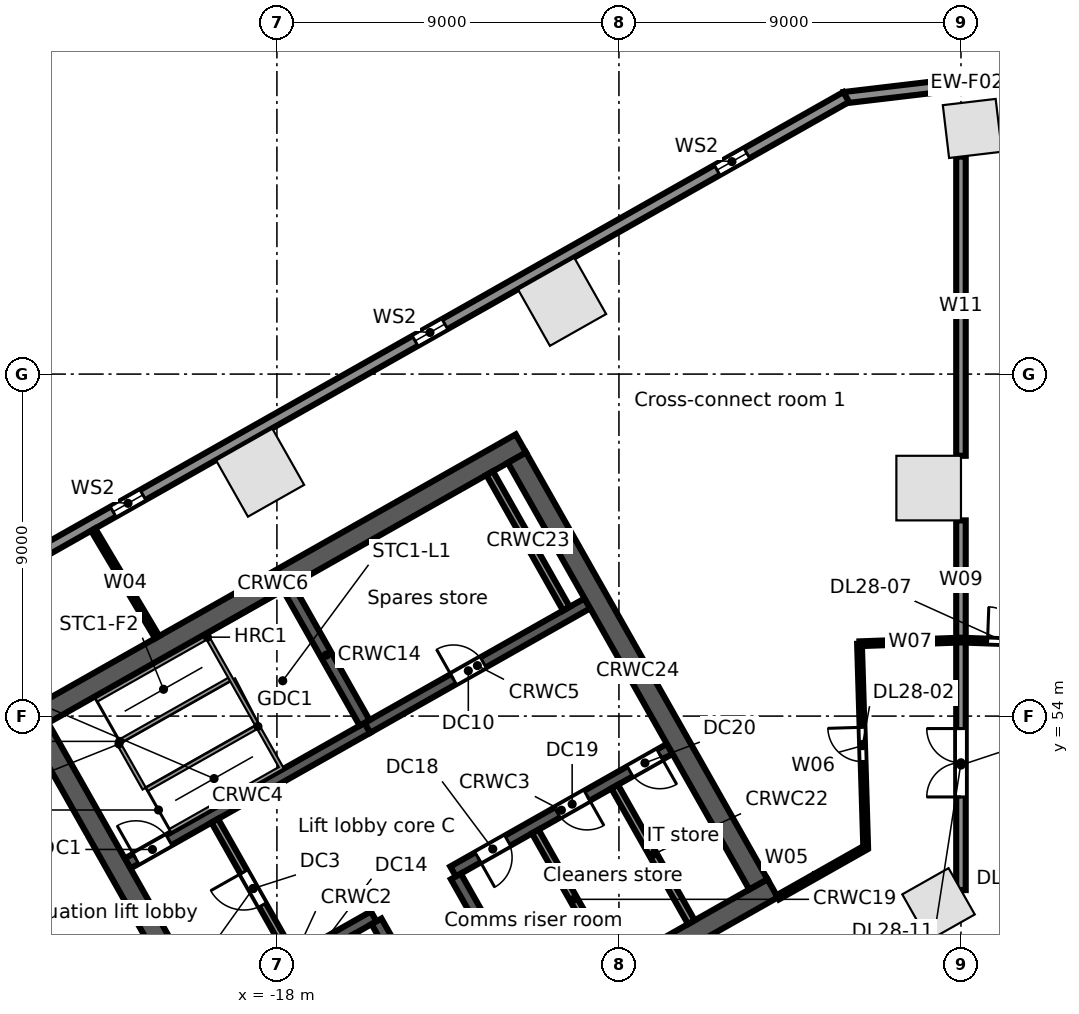
"""IFC4 building model, lengths in metres.
Left out: names, types, materials, properties, quantities, classifications, styles, units other than length and angle.
Written with IfcOpenShell. Run it as: python <this file> out.ifc"""

import sys

from ifc_helpers import new_model, si_unit, direction, frame, frame_2d, origin, origin_2d, place, context, subcontext, project, spatial, rectangle, extrude, element, fill, save


model = new_model("IFC4")
c1 = context("Model", 3, precision=1e-05, world=origin(), true_north=direction((0.0, 1.0)))
c2 = subcontext(c1, "Body", "Model", "MODEL_VIEW")
j1 = project(units=[si_unit("LENGTHUNIT", "METRE"), si_unit("PLANEANGLEUNIT", "RADIAN")], contexts=[c1])
p1 = place(None, origin())
s1 = spatial("IfcSite", under=j1, at=p1, CompositionType="ELEMENT")
p2 = place(p1, origin())
s2 = spatial("IfcBuilding", under=s1, at=p2, CompositionType="ELEMENT")
p3 = place(p2, frame((0.0, 0.0, 136.7)))
s3 = spatial("IfcBuildingStorey", under=s2, at=p3, CompositionType="ELEMENT", Elevation=136.7)
p4 = place(p3, frame((0.3, 69.464, 0.0), z_axis=(0.0, 0.0, 1.0), x_axis=(-0.993068456955, -0.117537397458, 0.0)))
e1 = element("IfcColumn", 1, at=p4, inside=s3, PredefinedType="COLUMN", context=c2, shape_type="SweptSolid", body=[
    extrude(rectangle(XDim=1.4, YDim=1.4, at=origin_2d()), origin(), (0.0, 0.0, 1.0), 4.4),
])
for number, where, z_axis, x_axis in (
    (2, (-10.495, 64.902, 0.0), (0.0, 0.0, 1.0), (-0.87, -0.492, 0.0)),
    (3, (-18.441, 60.406, 0.0), (0.0, 0.0, 1.0), (-0.87, -0.492, 0.0)),
):
    element("IfcColumn", number, at=place(p3, frame(where, z_axis=z_axis, x_axis=x_axis)), inside=s3, PredefinedType="COLUMN", context=c2, shape_type="SweptSolid", body=[
        extrude(rectangle(XDim=1.7, YDim=1.7, at=origin_2d()), origin(), (0.0, 0.0, 1.0), 4.4),
    ])
p5 = place(p3, frame((-0.591, 49.044, 0.0), z_axis=(0.0, 0.0, 1.0), x_axis=(0.87035569594, 0.492423560103, 0.0)))
e4 = element("IfcColumn", 4, at=p5, inside=s3, PredefinedType="COLUMN", context=c2, shape_type="SweptSolid", body=[
    extrude(rectangle(XDim=1.4, YDim=1.4, at=origin_2d()), origin(), (0.0, 0.0, 1.0), 4.4),
])
p6 = place(p3, frame((-0.85, 60.0, 0.0), z_axis=(0.0, 0.0, 1.0), x_axis=(0.0, 1.0, 0.0)))
e5 = element("IfcColumn", 5, at=p6, inside=s3, PredefinedType="COLUMN", context=c2, shape_type="SweptSolid", body=[
    extrude(rectangle(XDim=1.7, YDim=1.7, at=origin_2d()), origin(), (0.0, 0.0, 1.0), 4.4),
])
p7 = place(p3, frame((-3.076, 70.273, 0.0), z_axis=(0.0, 0.0, 1.0), x_axis=(0.993067743007, 0.117543429416, 0.0)))
e6 = element("IfcWall", 6, at=p7, inside=s3, PredefinedType="STANDARD", context=c2, shape_type="SweptSolid", body=[
    extrude(rectangle(XDim=6.516, YDim=0.3, at=frame_2d((3.258, 0.0))), origin(), (0.0, 0.0, 1.0), 4.08),
])
p8 = place(p3, frame((-58.745, 38.764, 0.0), z_axis=(0.0, 0.0, 1.0), x_axis=(0.870355811726, 0.492423355453, 0.0)))
e7 = element("IfcWall", 7, at=p8, inside=s3, PredefinedType="STANDARD", context=c2, shape_type="SweptSolid", body=[
    extrude(rectangle(XDim=64.025, YDim=0.3, at=frame_2d((32.013, 0.0))), origin(), (0.0, 0.0, 1.0), 4.08),
])
p9 = place(p8, frame((60.122, 0.0, 0.6)))
e8 = element("IfcOpeningElement", 8, at=p9, cuts=e7, PredefinedType="OPENING", context=c2, shape_type="SweptSolid", body=[
    extrude(rectangle(XDim=0.9, YDim=2.8, at=frame_2d((0.45, 1.4))), frame((0.0, 0.16, 0.0), z_axis=(0.0, -1.0, 0.0), x_axis=(1.0, 0.0, 0.0)), (0.0, 0.0, 1.0), 0.32),
])
p10 = place(p8, frame((50.992, 0.0, 0.6)))
e9 = element("IfcOpeningElement", 9, at=p10, cuts=e7, PredefinedType="OPENING", context=c2, shape_type="SweptSolid", body=[
    extrude(rectangle(XDim=0.9, YDim=2.8, at=frame_2d((0.45, 1.4))), frame((0.0, 0.16, 0.0), z_axis=(0.0, -1.0, 0.0), x_axis=(1.0, 0.0, 0.0)), (0.0, 0.0, 1.0), 0.32),
])
p11 = place(p8, frame((41.862, 0.0, 0.6)))
e10 = element("IfcOpeningElement", 10, at=p11, cuts=e7, PredefinedType="OPENING", context=c2, shape_type="SweptSolid", body=[
    extrude(rectangle(XDim=0.9, YDim=2.8, at=frame_2d((0.45, 1.4))), frame((0.0, 0.16, 0.0), z_axis=(0.0, -1.0, 0.0), x_axis=(1.0, 0.0, 0.0)), (0.0, 0.0, 1.0), 0.32),
])
p12 = place(p8, frame((32.732, 0.0, 0.6)))
e11 = element("IfcOpeningElement", 11, at=p12, cuts=e7, PredefinedType="OPENING", context=c2, shape_type="SweptSolid", body=[
    extrude(rectangle(XDim=0.9, YDim=2.8, at=frame_2d((0.45, 1.4))), frame((0.0, 0.16, 0.0), z_axis=(0.0, -1.0, 0.0), x_axis=(1.0, 0.0, 0.0)), (0.0, 0.0, 1.0), 0.32),
])
p13 = place(p8, frame((23.602, 0.0, 0.6)))
e12 = element("IfcOpeningElement", 12, at=p13, cuts=e7, PredefinedType="OPENING", context=c2, shape_type="SweptSolid", body=[
    extrude(rectangle(XDim=0.9, YDim=2.8, at=frame_2d((0.45, 1.4))), frame((0.0, 0.16, 0.0), z_axis=(0.0, -1.0, 0.0), x_axis=(1.0, 0.0, 0.0)), (0.0, 0.0, 1.0), 0.32),
])
p14 = place(p8, frame((14.472, 0.0, 0.6)))
e13 = element("IfcOpeningElement", 13, at=p14, cuts=e7, PredefinedType="OPENING", context=c2, shape_type="SweptSolid", body=[
    extrude(rectangle(XDim=0.9, YDim=2.8, at=frame_2d((0.45, 1.4))), frame((0.0, 0.16, 0.0), z_axis=(0.0, -1.0, 0.0), x_axis=(1.0, 0.0, 0.0)), (0.0, 0.0, 1.0), 0.32),
])
p15 = place(p8, frame((5.342, 0.0, 0.6)))
e14 = element("IfcOpeningElement", 14, at=p15, cuts=e7, PredefinedType="OPENING", context=c2, shape_type="SweptSolid", body=[
    extrude(rectangle(XDim=0.9, YDim=2.8, at=frame_2d((0.45, 1.4))), frame((0.0, 0.16, 0.0), z_axis=(0.0, -1.0, 0.0), x_axis=(1.0, 0.0, 0.0)), (0.0, 0.0, 1.0), 0.32),
])
p16 = place(p3, frame((-18.012, 42.083, 0.0), z_axis=(0.0, 0.0, 1.0), x_axis=(0.870360574057, 0.492414937962, 0.0)))
e15 = element("IfcWall", 15, at=p16, inside=s3, PredefinedType="SOLIDWALL", context=c2, shape_type="SweptSolid", body=[
    extrude(rectangle(XDim=15.0, YDim=0.55, at=frame_2d((7.5, 0.0))), origin(), (0.0, 0.0, 1.0), 4.08),
])
p17 = place(p16, frame((6.1, 0.0, 0.0)))
e16 = element("IfcOpeningElement", 16, at=p17, cuts=e15, PredefinedType="OPENING", context=c2, shape_type="SweptSolid", body=[
    extrude(rectangle(XDim=1.2, YDim=2.1, at=frame_2d((0.6, 1.05))), frame((0.0, 0.285, 0.0), z_axis=(0.0, -1.0, 0.0), x_axis=(1.0, 0.0, 0.0)), (0.0, 0.0, 1.0), 0.57),
])
p18 = place(p3, frame((-19.762, 46.292, 0.0), z_axis=(0.0, 0.0, 1.0), x_axis=(0.870359758983, 0.49241637863, 0.0)))
e17 = element("IfcWall", 17, at=p18, inside=s3, PredefinedType="SOLIDWALL", context=c2, shape_type="SweptSolid", body=[
    extrude(rectangle(XDim=4.95, YDim=0.3, at=frame_2d((2.475, 0.0))), origin(), (0.0, 0.0, 1.0), 4.08),
])
p19 = place(p18, frame((0.6, 0.0, 0.0)))
e18 = element("IfcOpeningElement", 18, at=p19, cuts=e17, PredefinedType="OPENING", context=c2, shape_type="SweptSolid", body=[
    extrude(rectangle(XDim=1.1, YDim=2.1, at=frame_2d((0.55, 1.05))), frame((0.0, 0.16, 0.0), z_axis=(0.0, -1.0, 0.0), x_axis=(1.0, 0.0, 0.0)), (0.0, 0.0, 1.0), 0.32),
])
p20 = place(p18, frame((2.9, 0.0, 0.0)))
e19 = element("IfcOpeningElement", 19, at=p20, cuts=e17, PredefinedType="OPENING", context=c2, shape_type="SweptSolid", body=[
    extrude(rectangle(XDim=0.9, YDim=2.1, at=frame_2d((0.45, 1.05))), frame((0.0, 0.16, 0.0), z_axis=(0.0, -1.0, 0.0), x_axis=(1.0, 0.0, 0.0)), (0.0, 0.0, 1.0), 0.32),
])
p21 = place(p3, frame((-13.365, 49.911, 0.0), z_axis=(0.0, 0.0, 1.0), x_axis=(0.870336435567, 0.492457601144, 0.0)))
e20 = element("IfcWall", 20, at=p21, inside=s3, PredefinedType="SOLIDWALL", context=c2, shape_type="SweptSolid", body=[
    extrude(rectangle(XDim=6.55, YDim=0.3, at=frame_2d((3.275, 0.0))), origin(), (0.0, 0.0, 1.0), 4.08),
])
p22 = place(p21, frame((0.75, 0.0, 0.0)))
e21 = element("IfcOpeningElement", 21, at=p22, cuts=e20, PredefinedType="OPENING", context=c2, shape_type="SweptSolid", body=[
    extrude(rectangle(XDim=0.9, YDim=2.1, at=frame_2d((0.45, 1.05))), frame((0.0, 0.16, 0.0), z_axis=(0.0, -1.0, 0.0), x_axis=(1.0, 0.0, 0.0)), (0.0, 0.0, 1.0), 0.32),
])
p23 = place(p21, frame((3.15, 0.0, 0.0)))
e22 = element("IfcOpeningElement", 22, at=p23, cuts=e20, PredefinedType="OPENING", context=c2, shape_type="SweptSolid", body=[
    extrude(rectangle(XDim=0.9, YDim=2.1, at=frame_2d((0.45, 1.05))), frame((0.0, 0.16, 0.0), z_axis=(0.0, -1.0, 0.0), x_axis=(1.0, 0.0, 0.0)), (0.0, 0.0, 1.0), 0.32),
])
p24 = place(p21, frame((5.35, 0.0, 0.0)))
e23 = element("IfcOpeningElement", 23, at=p24, cuts=e20, PredefinedType="OPENING", context=c2, shape_type="SweptSolid", body=[
    extrude(rectangle(XDim=0.9, YDim=2.1, at=frame_2d((0.45, 1.05))), frame((0.0, 0.16, 0.0), z_axis=(0.0, -1.0, 0.0), x_axis=(1.0, 0.0, 0.0)), (0.0, 0.0, 1.0), 0.32),
])
p25 = place(p3, frame((-21.928, 50.121, 0.0), z_axis=(0.0, 0.0, 1.0), x_axis=(0.870340732628, 0.49245000673, 0.0)))
e24 = element("IfcWall", 24, at=p25, inside=s3, PredefinedType="SOLIDWALL", context=c2, shape_type="SweptSolid", body=[
    extrude(rectangle(XDim=7.25, YDim=0.3, at=frame_2d((3.625, 0.0))), origin(), (0.0, 0.0, 1.0), 4.08),
])
p26 = place(p25, frame((0.25, 0.0, 0.0)))
e25 = element("IfcOpeningElement", 25, at=p26, cuts=e24, PredefinedType="OPENING", context=c2, shape_type="SweptSolid", body=[
    extrude(rectangle(XDim=1.0, YDim=2.1, at=frame_2d((0.5, 1.05))), frame((0.0, 0.16, 0.0), z_axis=(0.0, -1.0, 0.0), x_axis=(1.0, 0.0, 0.0)), (0.0, 0.0, 1.0), 0.32),
])
p27 = place(p3, frame((-15.618, 53.691, 0.0), z_axis=(0.0, 0.0, 1.0), x_axis=(0.870367894134, 0.492401999246, 0.0)))
e26 = element("IfcWall", 26, at=p27, inside=s3, PredefinedType="SOLIDWALL", context=c2, shape_type="SweptSolid", body=[
    extrude(rectangle(XDim=6.65, YDim=0.3, at=frame_2d((3.325, 0.0))), origin(), (0.0, 0.0, 1.0), 4.08),
])
p28 = place(p27, frame((2.6, 0.0, 0.0)))
e27 = element("IfcOpeningElement", 27, at=p28, cuts=e26, PredefinedType="OPENING", context=c2, shape_type="SweptSolid", body=[
    extrude(rectangle(XDim=0.9, YDim=2.1, at=frame_2d((0.45, 1.05))), frame((0.0, 0.16, 0.0), z_axis=(0.0, -1.0, 0.0), x_axis=(1.0, 0.0, 0.0)), (0.0, 0.0, 1.0), 0.32),
])
p29 = place(p3, frame((-24.635, 53.789, 0.0), z_axis=(0.0, 0.0, 1.0), x_axis=(0.870360574057, 0.492414937962, 0.0)))
e28 = element("IfcWall", 28, at=p29, inside=s3, PredefinedType="SOLIDWALL", context=c2, shape_type="SweptSolid", body=[
    extrude(rectangle(XDim=15.0, YDim=0.55, at=frame_2d((7.5, 0.0))), origin(), (0.0, 0.0, 1.0), 4.08),
])
p30 = place(p3, frame((-24.26, 53.685, 0.0), z_axis=(0.0, 0.0, 1.0), x_axis=(0.492427022044, -0.870353737259, 0.0)))
e29 = element("IfcWall", 29, at=p30, inside=s3, PredefinedType="SOLIDWALL", context=c2, shape_type="SweptSolid", body=[
    extrude(rectangle(XDim=12.9, YDim=0.55, at=frame_2d((6.45, 0.0))), origin(), (0.0, 0.0, 1.0), 4.08),
])
p31 = place(p3, frame((-19.635, 51.246, 0.0), z_axis=(0.0, 0.0, 1.0), x_axis=(0.492408451753, -0.87036424366, 0.0)))
e30 = element("IfcWall", 30, at=p31, inside=s3, PredefinedType="PARTITIONING", context=c2, shape_type="SweptSolid", body=[
    extrude(rectangle(XDim=4.1, YDim=0.2, at=frame_2d((2.05, 0.0))), origin(), (0.0, 0.0, 1.0), 4.08),
])
p32 = place(p31, frame((1.55, 0.0, 0.0)))
e31 = element("IfcOpeningElement", 31, at=p32, cuts=e30, PredefinedType="OPENING", context=c2, shape_type="SweptSolid", body=[
    extrude(rectangle(XDim=1.0, YDim=2.1, at=frame_2d((0.5, 1.05))), frame((0.0, 0.11, 0.0), z_axis=(0.0, -1.0, 0.0), x_axis=(1.0, 0.0, 0.0)), (0.0, 0.0, 1.0), 0.22),
])
for number, where, z_axis, x_axis in (
    (32, (-15.379, 48.599, 0.0), (0.0, 0.0, 1.0), (0.492, -0.87, 0.0)),
    (33, (-17.711, 57.39, 0.0), (0.0, 0.0, 1.0), (0.492, -0.87, 0.0)),
):
    element("IfcWall", number, at=place(p3, frame(where, z_axis=z_axis, x_axis=x_axis)), inside=s3, PredefinedType="SOLIDWALL", context=c2, shape_type="SweptSolid", body=[
        extrude(rectangle(XDim=4.1, YDim=0.3, at=frame_2d((2.05, 0.0))), origin(), (0.0, 0.0, 1.0), 4.08),
    ])
p33 = place(p3, frame((-13.291, 49.781, 0.0), z_axis=(0.0, 0.0, 1.0), x_axis=(0.492382931784, -0.870378681085, 0.0)))
e34 = element("IfcWall", 34, at=p33, inside=s3, PredefinedType="SOLIDWALL", context=c2, shape_type="SweptSolid", body=[
    extrude(rectangle(XDim=4.1, YDim=0.3, at=frame_2d((2.05, 0.0))), origin(), (0.0, 0.0, 1.0), 4.08),
])
p34 = place(p3, frame((-11.202, 50.962, 0.0), z_axis=(0.0, 0.0, 1.0), x_axis=(0.492428039142, -0.870353161807, 0.0)))
e35 = element("IfcWall", 35, at=p34, inside=s3, PredefinedType="PARTITIONING", context=c2, shape_type="SweptSolid", body=[
    extrude(rectangle(XDim=4.1, YDim=0.2, at=frame_2d((2.05, 0.0))), origin(), (0.0, 0.0, 1.0), 4.08),
])
p35 = place(p3, frame((-9.113, 52.144, 0.0), z_axis=(0.0, 0.0, 1.0), x_axis=(0.492408451753, -0.87036424366, 0.0)))
e36 = element("IfcWall", 36, at=p35, inside=s3, PredefinedType="PARTITIONING", context=c2, shape_type="SweptSolid", body=[
    extrude(rectangle(XDim=4.1, YDim=0.2, at=frame_2d((2.05, 0.0))), origin(), (0.0, 0.0, 1.0), 4.08),
])
p36 = place(p3, frame((-12.402, 60.394, 0.0), z_axis=(0.0, 0.0, 1.0), x_axis=(0.492453559952, -0.87033872216, 0.0)))
e37 = element("IfcWall", 37, at=p36, inside=s3, PredefinedType="SOLIDWALL", context=c2, shape_type="SweptSolid", body=[
    extrude(rectangle(XDim=4.1, YDim=0.2, at=frame_2d((2.05, 0.0))), origin(), (0.0, 0.0, 1.0), 4.08),
])
p37 = place(p3, frame((-11.684, 60.8, 0.0), z_axis=(0.0, 0.0, 1.0), x_axis=(0.492427022044, -0.870353737259, 0.0)))
e38 = element("IfcWall", 38, at=p37, inside=s3, PredefinedType="SOLIDWALL", context=c2, shape_type="SweptSolid", body=[
    extrude(rectangle(XDim=12.9, YDim=0.55, at=frame_2d((6.45, 0.0))), origin(), (0.0, 0.0, 1.0), 4.08),
])
p38 = place(p3, frame((-22.835, 58.908, 0.0), z_axis=(0.0, 0.0, 1.0), x_axis=(0.511113859879, -0.859513014584, 0.0)))
e39 = element("IfcWall", 39, at=p38, inside=s3, PredefinedType="PARTITIONING", context=c2, shape_type="SweptSolid", body=[
    extrude(rectangle(XDim=3.295, YDim=0.125, at=frame_2d((1.647, 0.0))), origin(), (0.0, 0.0, 1.0), 3.36),
])
p39 = place(p3, frame((-4.821, 49.23, 0.0), z_axis=(0.0, 0.0, 1.0), x_axis=(0.870371217631, 0.492396124598, 0.0)))
e40 = element("IfcWall", 40, at=p39, inside=s3, PredefinedType="PARTITIONING", context=c2, shape_type="SweptSolid", body=[
    extrude(rectangle(XDim=2.659, YDim=0.125, at=frame_2d((1.329, 0.0))), origin(), (0.0, 0.0, 1.0), 4.08),
])
p40 = place(p3, frame((-2.67, 55.904, 0.0), z_axis=(0.0, 0.0, 1.0), x_axis=(0.030338701418, -0.999539675649, 0.0)))
e41 = element("IfcWall", 41, at=p40, inside=s3, PredefinedType="PARTITIONING", context=c2, shape_type="SweptSolid", body=[
    extrude(rectangle(XDim=5.367, YDim=0.125, at=frame_2d((2.684, 0.0))), origin(), (0.0, 0.0, 1.0), 4.08),
])
p41 = place(p40, frame((2.2, 0.0, 0.0)))
e42 = element("IfcOpeningElement", 42, at=p41, cuts=e41, PredefinedType="OPENING", context=c2, shape_type="SweptSolid", body=[
    extrude(rectangle(XDim=0.9, YDim=2.1, at=frame_2d((0.45, 1.05))), frame((0.0, 0.073, 0.0), z_axis=(0.0, -1.0, 0.0), x_axis=(1.0, 0.0, 0.0)), (0.0, 0.0, 1.0), 0.145),
])
p42 = place(p3, frame((-2.67, 55.904, 0.0), z_axis=(0.0, 0.0, 1.0), x_axis=(0.999354913865, 0.03591317494, 0.0)))
e43 = element("IfcWall", 43, at=p42, inside=s3, PredefinedType="PARTITIONING", context=c2, shape_type="SweptSolid", body=[
    extrude(rectangle(XDim=2.672, YDim=0.125, at=frame_2d((1.336, 0.0))), origin(), (0.0, 0.0, 1.0), 3.142),
])
p43 = place(p3, frame((0.0, 49.422, 0.0), z_axis=(0.0, 0.0, 1.0), x_axis=(0.0, 1.0, 0.0)))
e44 = element("IfcWall", 44, at=p43, inside=s3, PredefinedType="PARTITIONING", context=c2, shape_type="SweptSolid", body=[
    extrude(rectangle(XDim=6.578, YDim=0.25, at=frame_2d((3.289, 0.0))), origin(), (0.0, 0.0, 1.0), 4.08),
])
p44 = place(p43, frame((2.45, 0.0, 0.0)))
e45 = element("IfcOpeningElement", 45, at=p44, cuts=e44, PredefinedType="OPENING", context=c2, shape_type="SweptSolid", body=[
    extrude(rectangle(XDim=1.8, YDim=2.1, at=frame_2d((0.9, 1.05))), frame((0.0, 0.135, 0.0), z_axis=(0.0, -1.0, 0.0), x_axis=(1.0, 0.0, 0.0)), (0.0, 0.0, 1.0), 0.27),
])
p45 = place(p3, frame((0.0, 56.0, 0.0), z_axis=(0.0, 0.0, 1.0), x_axis=(0.0, 1.0, 0.0)))
e46 = element("IfcWall", 46, at=p45, inside=s3, PredefinedType="PARTITIONING", context=c2, shape_type="SweptSolid", body=[
    extrude(rectangle(XDim=3.15, YDim=0.25, at=frame_2d((1.575, 0.0))), origin(), (0.0, 0.0, 1.0), 4.08),
])
p46 = place(p3, frame((0.0, 56.0, 0.0), z_axis=(0.0, 0.0, 1.0), x_axis=(0.999349313684, -0.036068673934, 0.0)))
e47 = element("IfcWall", 47, at=p46, inside=s3, PredefinedType="PARTITIONING", context=c2, shape_type="SweptSolid", body=[
    extrude(rectangle(XDim=2.471, YDim=0.125, at=frame_2d((1.235, 0.0))), origin(), (0.0, 0.0, 1.0), 4.08),
])
p47 = place(p46, frame((0.7, 0.0, 0.0)))
e48 = element("IfcOpeningElement", 48, at=p47, cuts=e47, PredefinedType="OPENING", context=c2, shape_type="SweptSolid", body=[
    extrude(rectangle(XDim=0.9, YDim=2.1, at=frame_2d((0.45, 1.05))), frame((0.0, 0.073, 0.0), z_axis=(0.0, -1.0, 0.0), x_axis=(1.0, 0.0, 0.0)), (0.0, 0.0, 1.0), 0.145),
])
p48 = place(p3, frame((0.0, 60.85, 0.0), z_axis=(0.0, 0.0, 1.0), x_axis=(0.0, 1.0, 0.0)))
e49 = element("IfcWall", 49, at=p48, inside=s3, PredefinedType="PARTITIONING", context=c2, shape_type="SweptSolid", body=[
    extrude(rectangle(XDim=7.874, YDim=0.25, at=frame_2d((3.937, 0.0))), origin(), (0.0, 0.0, 1.0), 3.352),
])
p49 = place(p9, origin())
e50 = element("IfcWindow", 50, at=p49, inside=s3, PartitioningType="SINGLE_PANEL", PredefinedType="WINDOW", context=c2, shape_type="SweptSolid", body=[
    extrude(rectangle(XDim=0.9, YDim=2.8, at=frame_2d((0.45, 1.4))), frame((0.0, 0.03, 0.0), z_axis=(0.0, -1.0, 0.0), x_axis=(1.0, 0.0, 0.0)), (0.0, 0.0, 1.0), 0.06),
])
fill(e8, e50)
p50 = place(p10, origin())
e51 = element("IfcWindow", 51, at=p50, inside=s3, PartitioningType="SINGLE_PANEL", PredefinedType="WINDOW", context=c2, shape_type="SweptSolid", body=[
    extrude(rectangle(XDim=0.9, YDim=2.8, at=frame_2d((0.45, 1.4))), frame((0.0, 0.03, 0.0), z_axis=(0.0, -1.0, 0.0), x_axis=(1.0, 0.0, 0.0)), (0.0, 0.0, 1.0), 0.06),
])
fill(e9, e51)
p51 = place(p11, origin())
e52 = element("IfcWindow", 52, at=p51, inside=s3, PartitioningType="SINGLE_PANEL", PredefinedType="WINDOW", context=c2, shape_type="SweptSolid", body=[
    extrude(rectangle(XDim=0.9, YDim=2.8, at=frame_2d((0.45, 1.4))), frame((0.0, 0.03, 0.0), z_axis=(0.0, -1.0, 0.0), x_axis=(1.0, 0.0, 0.0)), (0.0, 0.0, 1.0), 0.06),
])
fill(e10, e52)
p52 = place(p26, origin())
e53 = element("IfcDoor", 53, at=p52, inside=s3, OperationType="SINGLE_SWING_LEFT", PredefinedType="DOOR", context=c2, shape_type="SweptSolid", body=[
    extrude(rectangle(XDim=1.0, YDim=2.1, at=frame_2d((0.5, 1.05))), frame((0.0, 0.025, 0.0), z_axis=(0.0, -1.0, 0.0), x_axis=(1.0, 0.0, 0.0)), (0.0, 0.0, 1.0), 0.05),
])
fill(e25, e53)
p53 = place(p32, frame((1.0, 0.0, 0.0), z_axis=(0.0, 0.0, 1.0), x_axis=(-1.0, 0.0, 0.0)))
e54 = element("IfcDoor", 54, at=p53, inside=s3, OperationType="SINGLE_SWING_RIGHT", PredefinedType="DOOR", context=c2, shape_type="SweptSolid", body=[
    extrude(rectangle(XDim=1.0, YDim=2.1, at=frame_2d((0.5, 1.05))), frame((0.0, 0.025, 0.0), z_axis=(0.0, -1.0, 0.0), x_axis=(1.0, 0.0, 0.0)), (0.0, 0.0, 1.0), 0.05),
])
fill(e31, e54)
p54 = place(p28, origin())
e55 = element("IfcDoor", 55, at=p54, inside=s3, OperationType="SINGLE_SWING_LEFT", PredefinedType="DOOR", context=c2, shape_type="SweptSolid", body=[
    extrude(rectangle(XDim=0.9, YDim=2.1, at=frame_2d((0.45, 1.05))), frame((0.0, 0.025, 0.0), z_axis=(0.0, -1.0, 0.0), x_axis=(1.0, 0.0, 0.0)), (0.0, 0.0, 1.0), 0.05),
])
fill(e27, e55)
p55 = place(p22, frame((0.9, 0.0, 0.0), z_axis=(0.0, 0.0, 1.0), x_axis=(-1.0, 0.0, 0.0)))
e56 = element("IfcDoor", 56, at=p55, inside=s3, OperationType="SINGLE_SWING_RIGHT", PredefinedType="DOOR", context=c2, shape_type="SweptSolid", body=[
    extrude(rectangle(XDim=0.9, YDim=2.1, at=frame_2d((0.45, 1.05))), frame((0.0, 0.025, 0.0), z_axis=(0.0, -1.0, 0.0), x_axis=(1.0, 0.0, 0.0)), (0.0, 0.0, 1.0), 0.05),
])
fill(e21, e56)
p56 = place(p23, frame((0.9, 0.0, 0.0), z_axis=(0.0, 0.0, 1.0), x_axis=(-1.0, 0.0, 0.0)))
e57 = element("IfcDoor", 57, at=p56, inside=s3, OperationType="SINGLE_SWING_LEFT", PredefinedType="DOOR", context=c2, shape_type="SweptSolid", body=[
    extrude(rectangle(XDim=0.9, YDim=2.1, at=frame_2d((0.45, 1.05))), frame((0.0, 0.025, 0.0), z_axis=(0.0, -1.0, 0.0), x_axis=(1.0, 0.0, 0.0)), (0.0, 0.0, 1.0), 0.05),
])
fill(e22, e57)
p57 = place(p24, frame((0.9, 0.0, 0.0), z_axis=(0.0, 0.0, 1.0), x_axis=(-1.0, 0.0, 0.0)))
e58 = element("IfcDoor", 58, at=p57, inside=s3, OperationType="SINGLE_SWING_LEFT", PredefinedType="DOOR", context=c2, shape_type="SweptSolid", body=[
    extrude(rectangle(XDim=0.9, YDim=2.1, at=frame_2d((0.45, 1.05))), frame((0.0, 0.025, 0.0), z_axis=(0.0, -1.0, 0.0), x_axis=(1.0, 0.0, 0.0)), (0.0, 0.0, 1.0), 0.05),
])
fill(e23, e58)
p58 = place(p41, frame((0.9, 0.0, 0.0), z_axis=(0.0, 0.0, 1.0), x_axis=(-1.0, 0.0, 0.0)))
e59 = element("IfcDoor", 59, at=p58, inside=s3, OperationType="SINGLE_SWING_RIGHT", PredefinedType="DOOR", context=c2, shape_type="SweptSolid", body=[
    extrude(rectangle(XDim=0.9, YDim=2.1, at=frame_2d((0.45, 1.05))), frame((0.0, 0.025, 0.0), z_axis=(0.0, -1.0, 0.0), x_axis=(1.0, 0.0, 0.0)), (0.0, 0.0, 1.0), 0.05),
])
fill(e42, e59)
p59 = place(p47, origin())
e60 = element("IfcDoor", 60, at=p59, inside=s3, OperationType="SINGLE_SWING_LEFT", PredefinedType="DOOR", context=c2, shape_type="SweptSolid", body=[
    extrude(rectangle(XDim=0.9, YDim=2.1, at=frame_2d((0.45, 1.05))), frame((0.0, 0.025, 0.0), z_axis=(0.0, -1.0, 0.0), x_axis=(1.0, 0.0, 0.0)), (0.0, 0.0, 1.0), 0.05),
])
fill(e48, e60)
p60 = place(p44, origin())
e61 = element("IfcDoor", 61, at=p60, inside=s3, OperationType="DOUBLE_DOOR_SINGLE_SWING", PredefinedType="DOOR", context=c2, shape_type="SweptSolid", body=[
    extrude(rectangle(XDim=1.8, YDim=2.1, at=frame_2d((0.9, 1.05))), frame((0.0, 0.025, 0.0), z_axis=(0.0, -1.0, 0.0), x_axis=(1.0, 0.0, 0.0)), (0.0, 0.0, 1.0), 0.05),
])
fill(e45, e61)
save(model, sys.argv[1])
